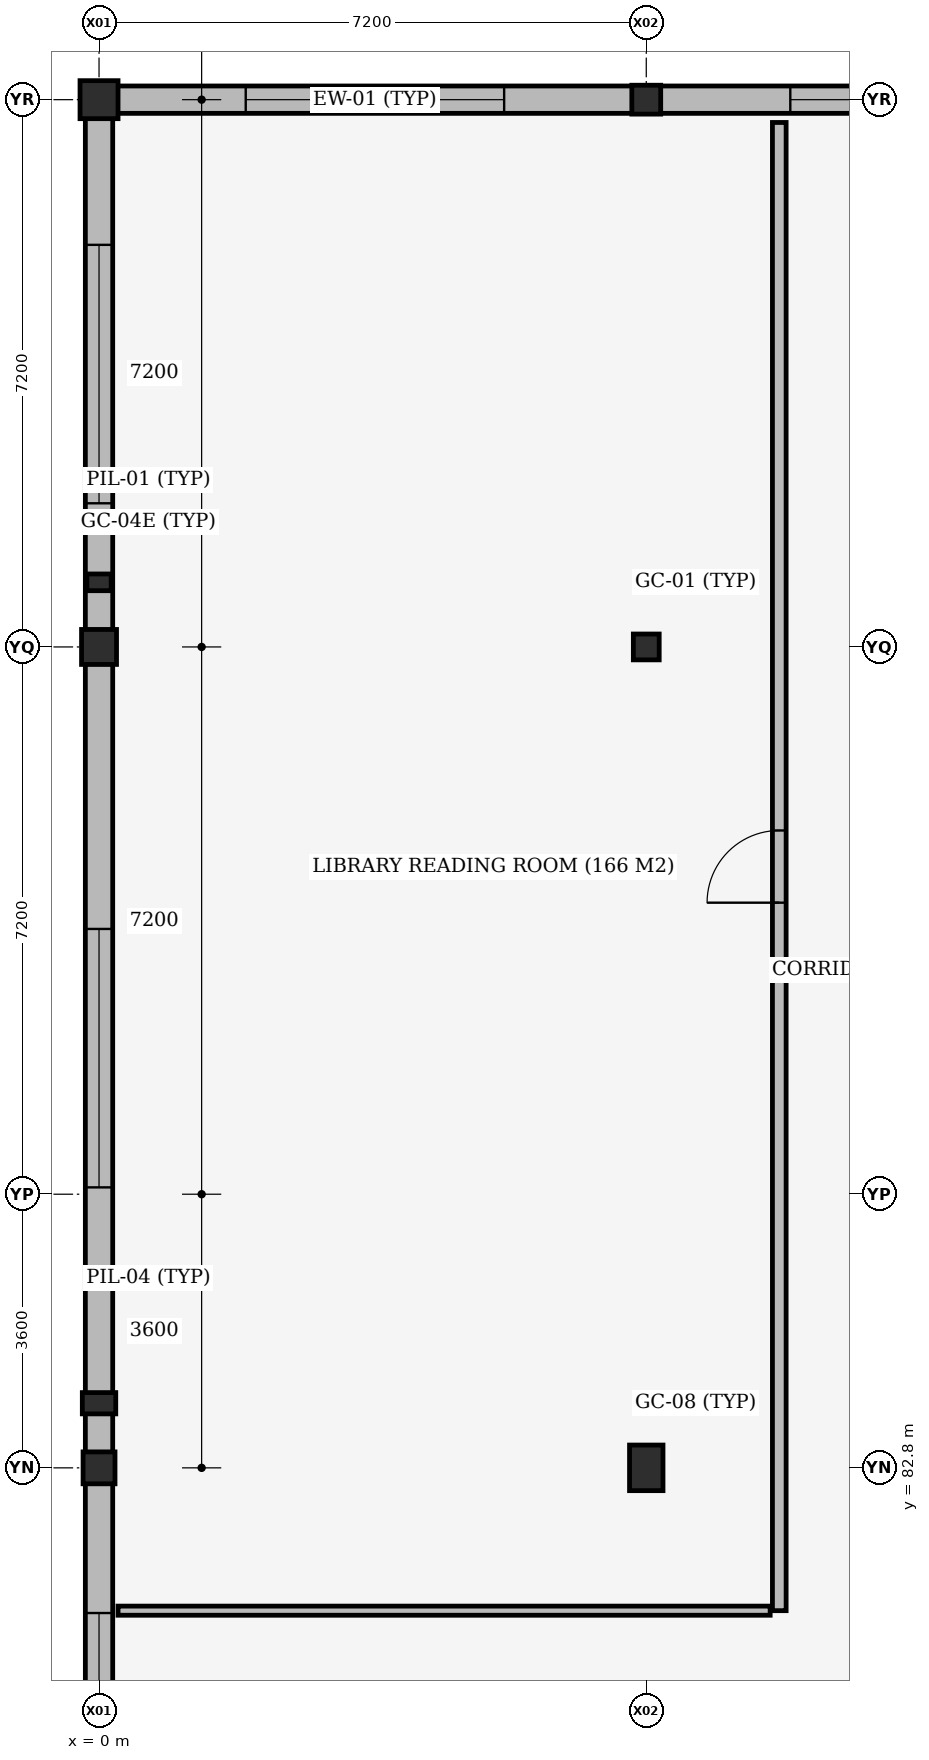
"""IFC4 building model, lengths in metres.
Left out: names, types, materials, properties, quantities, classifications, styles, units other than length and angle.
Written with IfcOpenShell. Run it as: python <this file> out.ifc"""

import sys

from ifc_helpers import new_model, si_unit, direction, frame, frame_2d, origin, origin_2d, place, context, subcontext, project, spatial, rectangle, extrude, element, fill, save


model = new_model("IFC4")
c1 = context("Model", 3, precision=1e-05, world=origin(), true_north=direction((0.0, 1.0)))
c2 = subcontext(c1, "Body", "Model", "MODEL_VIEW")
j1 = project(units=[si_unit("LENGTHUNIT", "METRE"), si_unit("PLANEANGLEUNIT", "RADIAN")], contexts=[c1])
p1 = place(None, origin())
s1 = spatial("IfcSite", under=j1, at=p1, CompositionType="ELEMENT")
p2 = place(p1, origin())
s2 = spatial("IfcBuilding", under=s1, at=p2, CompositionType="ELEMENT")
p3 = place(p2, frame((0.0, 0.0, 9.6)))
s3 = spatial("IfcBuildingStorey", under=s2, at=p3, CompositionType="ELEMENT", Elevation=9.6)
p4 = place(p3, frame((0.0, 82.8, 0.0), z_axis=(0.0, 0.0, 1.0), x_axis=(1.0, 0.0, 0.0)))
e1 = element("IfcColumn", 1, at=p4, inside=s3, PredefinedType="COLUMN", context=c2, shape_type="SweptSolid", body=[
    extrude(rectangle(XDim=0.42, YDim=0.42, at=origin_2d()), origin(), (0.0, 0.0, 1.0), 3.89),
])
p5 = place(p3, frame((0.0, 93.6, 0.0), z_axis=(0.0, 0.0, 1.0), x_axis=(1.0, 0.0, 0.0)))
e2 = element("IfcColumn", 2, at=p5, inside=s3, PredefinedType="COLUMN", context=c2, shape_type="SweptSolid", body=[
    extrude(rectangle(XDim=0.46, YDim=0.46, at=origin_2d()), origin(), (0.0, 0.0, 1.0), 3.89),
])
p6 = place(p3, frame((0.0, 100.8, 0.0), z_axis=(0.0, 0.0, 1.0), x_axis=(1.0, 0.0, 0.0)))
e3 = element("IfcColumn", 3, at=p6, inside=s3, PredefinedType="COLUMN", context=c2, shape_type="SweptSolid", body=[
    extrude(rectangle(XDim=0.5, YDim=0.5, at=origin_2d()), origin(), (0.0, 0.0, 1.0), 3.89),
])
p7 = place(p3, frame((7.2, 82.8, 0.0), z_axis=(0.0, 0.0, 1.0), x_axis=(1.0, 0.0, 0.0)))
e4 = element("IfcColumn", 4, at=p7, inside=s3, PredefinedType="COLUMN", context=c2, shape_type="SweptSolid", body=[
    extrude(rectangle(XDim=0.44, YDim=0.6, at=origin_2d()), origin(), (0.0, 0.0, 1.0), 3.89),
])
p8 = place(p3, frame((7.2, 93.6, 0.0), z_axis=(0.0, 0.0, 1.0), x_axis=(1.0, 0.0, 0.0)))
e5 = element("IfcColumn", 5, at=p8, inside=s3, PredefinedType="COLUMN", context=c2, shape_type="SweptSolid", body=[
    extrude(rectangle(XDim=0.34, YDim=0.34, at=origin_2d()), origin(), (0.0, 0.0, 1.0), 3.89),
])
p9 = place(p3, frame((7.2, 100.8, 0.0), z_axis=(0.0, 0.0, 1.0), x_axis=(1.0, 0.0, 0.0)))
e6 = element("IfcColumn", 6, at=p9, inside=s3, PredefinedType="COLUMN", context=c2, shape_type="SweptSolid", body=[
    extrude(rectangle(XDim=0.38, YDim=0.38, at=origin_2d()), origin(), (0.0, 0.0, 1.0), 3.89),
])
p10 = place(p3, frame((0.0, 83.65, 0.0), z_axis=(0.0, 0.0, 1.0), x_axis=(1.0, 0.0, 0.0)))
e7 = element("IfcColumn", 7, at=p10, inside=s3, PredefinedType="PILASTER", context=c2, shape_type="SweptSolid", body=[
    extrude(rectangle(XDim=0.44, YDim=0.28, at=origin_2d()), origin(), (0.0, 0.0, 1.0), 3.89),
])
p11 = place(p3, frame((0.0, 94.45, 0.0), z_axis=(0.0, 0.0, 1.0), x_axis=(1.0, 0.0, 0.0)))
e8 = element("IfcColumn", 8, at=p11, inside=s3, PredefinedType="PILASTER", context=c2, shape_type="SweptSolid", body=[
    extrude(rectangle(XDim=0.32, YDim=0.22, at=origin_2d()), origin(), (0.0, 0.0, 1.0), 3.89),
])
p12 = place(p3, frame((0.242, 100.8, 0.0), z_axis=(0.0, 0.0, 1.0), x_axis=(1.0, 0.0, 0.0)))
e9 = element("IfcWall", 9, at=p12, inside=s3, PredefinedType="STANDARD", context=c2, shape_type="SweptSolid", body=[
    extrude(rectangle(XDim=6.776, YDim=0.36, at=frame_2d((3.388, 0.0))), origin(), (0.0, 0.0, 1.0), 3.31),
])
p13 = place(p12, frame((1.688, 0.0, 0.9)))
e10 = element("IfcOpeningElement", 10, at=p13, cuts=e9, PredefinedType="OPENING", context=c2, shape_type="SweptSolid", body=[
    extrude(rectangle(XDim=3.4, YDim=1.5, at=frame_2d((1.7, 0.75))), frame((0.0, 0.19, 0.0), z_axis=(0.0, -1.0, 0.0), x_axis=(1.0, 0.0, 0.0)), (0.0, 0.0, 1.0), 0.38),
])
p14 = place(p3, frame((7.382, 100.8, 0.0), z_axis=(0.0, 0.0, 1.0), x_axis=(1.0, 0.0, 0.0)))
e11 = element("IfcWall", 11, at=p14, inside=s3, PredefinedType="STANDARD", context=c2, shape_type="SweptSolid", body=[
    extrude(rectangle(XDim=6.826, YDim=0.36, at=frame_2d((3.413, 0.0))), origin(), (0.0, 0.0, 1.0), 3.25),
])
p15 = place(p14, frame((1.713, 0.0, 0.9)))
e12 = element("IfcOpeningElement", 12, at=p15, cuts=e11, PredefinedType="OPENING", context=c2, shape_type="SweptSolid", body=[
    extrude(rectangle(XDim=3.4, YDim=1.5, at=frame_2d((1.7, 0.75))), frame((0.0, 0.19, 0.0), z_axis=(0.0, -1.0, 0.0), x_axis=(1.0, 0.0, 0.0)), (0.0, 0.0, 1.0), 0.38),
])
p16 = place(p3, frame((0.0, 75.782, 0.0), z_axis=(0.0, 0.0, 1.0), x_axis=(0.0, 1.0, 0.0)))
e13 = element("IfcWall", 13, at=p16, inside=s3, PredefinedType="STANDARD", context=c2, shape_type="SweptSolid", body=[
    extrude(rectangle(XDim=6.816, YDim=0.36, at=frame_2d((3.408, 0.0))), origin(), (0.0, 0.0, 1.0), 3.31),
])
p17 = place(p16, frame((1.708, 0.0, 0.9)))
e14 = element("IfcOpeningElement", 14, at=p17, cuts=e13, PredefinedType="OPENING", context=c2, shape_type="SweptSolid", body=[
    extrude(rectangle(XDim=3.4, YDim=1.5, at=frame_2d((1.7, 0.75))), frame((0.0, 0.19, 0.0), z_axis=(0.0, -1.0, 0.0), x_axis=(1.0, 0.0, 0.0)), (0.0, 0.0, 1.0), 0.38),
])
p18 = place(p3, frame((0.0, 83.002, 0.0), z_axis=(0.0, 0.0, 1.0), x_axis=(0.0, 1.0, 0.0)))
e15 = element("IfcWall", 15, at=p18, inside=s3, PredefinedType="STANDARD", context=c2, shape_type="SweptSolid", body=[
    extrude(rectangle(XDim=10.376, YDim=0.36, at=frame_2d((5.188, 0.0))), origin(), (0.0, 0.0, 1.0), 3.25),
])
p19 = place(p18, frame((3.488, 0.0, 0.9)))
e16 = element("IfcOpeningElement", 16, at=p19, cuts=e15, PredefinedType="OPENING", context=c2, shape_type="SweptSolid", body=[
    extrude(rectangle(XDim=3.4, YDim=1.5, at=frame_2d((1.7, 0.75))), frame((0.0, 0.19, 0.0), z_axis=(0.0, -1.0, 0.0), x_axis=(1.0, 0.0, 0.0)), (0.0, 0.0, 1.0), 0.38),
])
p20 = place(p3, frame((0.0, 93.822, 0.0), z_axis=(0.0, 0.0, 1.0), x_axis=(0.0, 1.0, 0.0)))
e17 = element("IfcWall", 17, at=p20, inside=s3, PredefinedType="STANDARD", context=c2, shape_type="SweptSolid", body=[
    extrude(rectangle(XDim=6.736, YDim=0.36, at=frame_2d((3.368, 0.0))), origin(), (0.0, 0.0, 1.0), 3.21),
])
p21 = place(p20, frame((1.668, 0.0, 0.9)))
e18 = element("IfcOpeningElement", 18, at=p21, cuts=e17, PredefinedType="OPENING", context=c2, shape_type="SweptSolid", body=[
    extrude(rectangle(XDim=3.4, YDim=1.5, at=frame_2d((1.7, 0.75))), frame((0.0, 0.19, 0.0), z_axis=(0.0, -1.0, 0.0), x_axis=(1.0, 0.0, 0.0)), (0.0, 0.0, 1.0), 0.38),
])
p22 = place(p3, frame((0.25, 80.921, 0.0), z_axis=(0.0, 0.0, 1.0), x_axis=(1.0, 0.0, 0.0)))
e19 = element("IfcWall", 19, at=p22, inside=s3, PredefinedType="PARTITIONING", context=c2, shape_type="SweptSolid", body=[
    extrude(rectangle(XDim=8.58, YDim=0.12, at=frame_2d((4.29, 0.0))), origin(), (0.0, 0.0, 1.0), 3.25),
])
p23 = place(p3, frame((8.95, 80.921, 0.0), z_axis=(0.0, 0.0, 1.0), x_axis=(0.0, 1.0, 0.0)))
e20 = element("IfcWall", 20, at=p23, inside=s3, PredefinedType="PARTITIONING", context=c2, shape_type="SweptSolid", body=[
    extrude(rectangle(XDim=19.579, YDim=0.18, at=frame_2d((9.79, 0.0))), origin(), (0.0, 0.0, 1.0), 3.31),
])
p24 = place(p23, frame((9.314, 0.0, 0.0)))
e21 = element("IfcOpeningElement", 21, at=p24, cuts=e20, PredefinedType="OPENING", context=c2, shape_type="SweptSolid", body=[
    extrude(rectangle(XDim=0.95, YDim=2.15, at=frame_2d((0.475, 1.075))), frame((0.0, 0.1, 0.0), z_axis=(0.0, -1.0, 0.0), x_axis=(1.0, 0.0, 0.0)), (0.0, 0.0, 1.0), 0.2),
])
p25 = place(p13, origin())
e22 = element("IfcWindow", 22, at=p25, inside=s3, PartitioningType="DOUBLE_PANEL_VERTICAL", PredefinedType="WINDOW", context=c2, shape_type="SweptSolid", body=[
    extrude(rectangle(XDim=3.4, YDim=1.5, at=frame_2d((1.7, 0.75))), frame((0.0, 0.03, 0.0), z_axis=(0.0, -1.0, 0.0), x_axis=(1.0, 0.0, 0.0)), (0.0, 0.0, 1.0), 0.06),
])
fill(e10, e22)
p26 = place(p15, origin())
e23 = element("IfcWindow", 23, at=p26, inside=s3, PartitioningType="DOUBLE_PANEL_VERTICAL", PredefinedType="WINDOW", context=c2, shape_type="SweptSolid", body=[
    extrude(rectangle(XDim=3.4, YDim=1.5, at=frame_2d((1.7, 0.75))), frame((0.0, 0.03, 0.0), z_axis=(0.0, -1.0, 0.0), x_axis=(1.0, 0.0, 0.0)), (0.0, 0.0, 1.0), 0.06),
])
fill(e12, e23)
p27 = place(p17, origin())
e24 = element("IfcWindow", 24, at=p27, inside=s3, PartitioningType="DOUBLE_PANEL_VERTICAL", PredefinedType="WINDOW", context=c2, shape_type="SweptSolid", body=[
    extrude(rectangle(XDim=3.4, YDim=1.5, at=frame_2d((1.7, 0.75))), frame((0.0, 0.03, 0.0), z_axis=(0.0, -1.0, 0.0), x_axis=(1.0, 0.0, 0.0)), (0.0, 0.0, 1.0), 0.06),
])
fill(e14, e24)
p28 = place(p19, origin())
e25 = element("IfcWindow", 25, at=p28, inside=s3, PartitioningType="DOUBLE_PANEL_VERTICAL", PredefinedType="WINDOW", context=c2, shape_type="SweptSolid", body=[
    extrude(rectangle(XDim=3.4, YDim=1.5, at=frame_2d((1.7, 0.75))), frame((0.0, 0.03, 0.0), z_axis=(0.0, -1.0, 0.0), x_axis=(1.0, 0.0, 0.0)), (0.0, 0.0, 1.0), 0.06),
])
fill(e16, e25)
p29 = place(p21, origin())
e26 = element("IfcWindow", 26, at=p29, inside=s3, PartitioningType="DOUBLE_PANEL_VERTICAL", PredefinedType="WINDOW", context=c2, shape_type="SweptSolid", body=[
    extrude(rectangle(XDim=3.4, YDim=1.5, at=frame_2d((1.7, 0.75))), frame((0.0, 0.03, 0.0), z_axis=(0.0, -1.0, 0.0), x_axis=(1.0, 0.0, 0.0)), (0.0, 0.0, 1.0), 0.06),
])
fill(e18, e26)
p30 = place(p24, origin())
e27 = element("IfcDoor", 27, at=p30, inside=s3, OperationType="SINGLE_SWING_LEFT", PredefinedType="DOOR", context=c2, shape_type="SweptSolid", body=[
    extrude(rectangle(XDim=0.95, YDim=2.15, at=frame_2d((0.475, 1.075))), frame((0.0, 0.025, 0.0), z_axis=(0.0, -1.0, 0.0), x_axis=(1.0, 0.0, 0.0)), (0.0, 0.0, 1.0), 0.05),
])
fill(e21, e27)
save(model, sys.argv[1])
